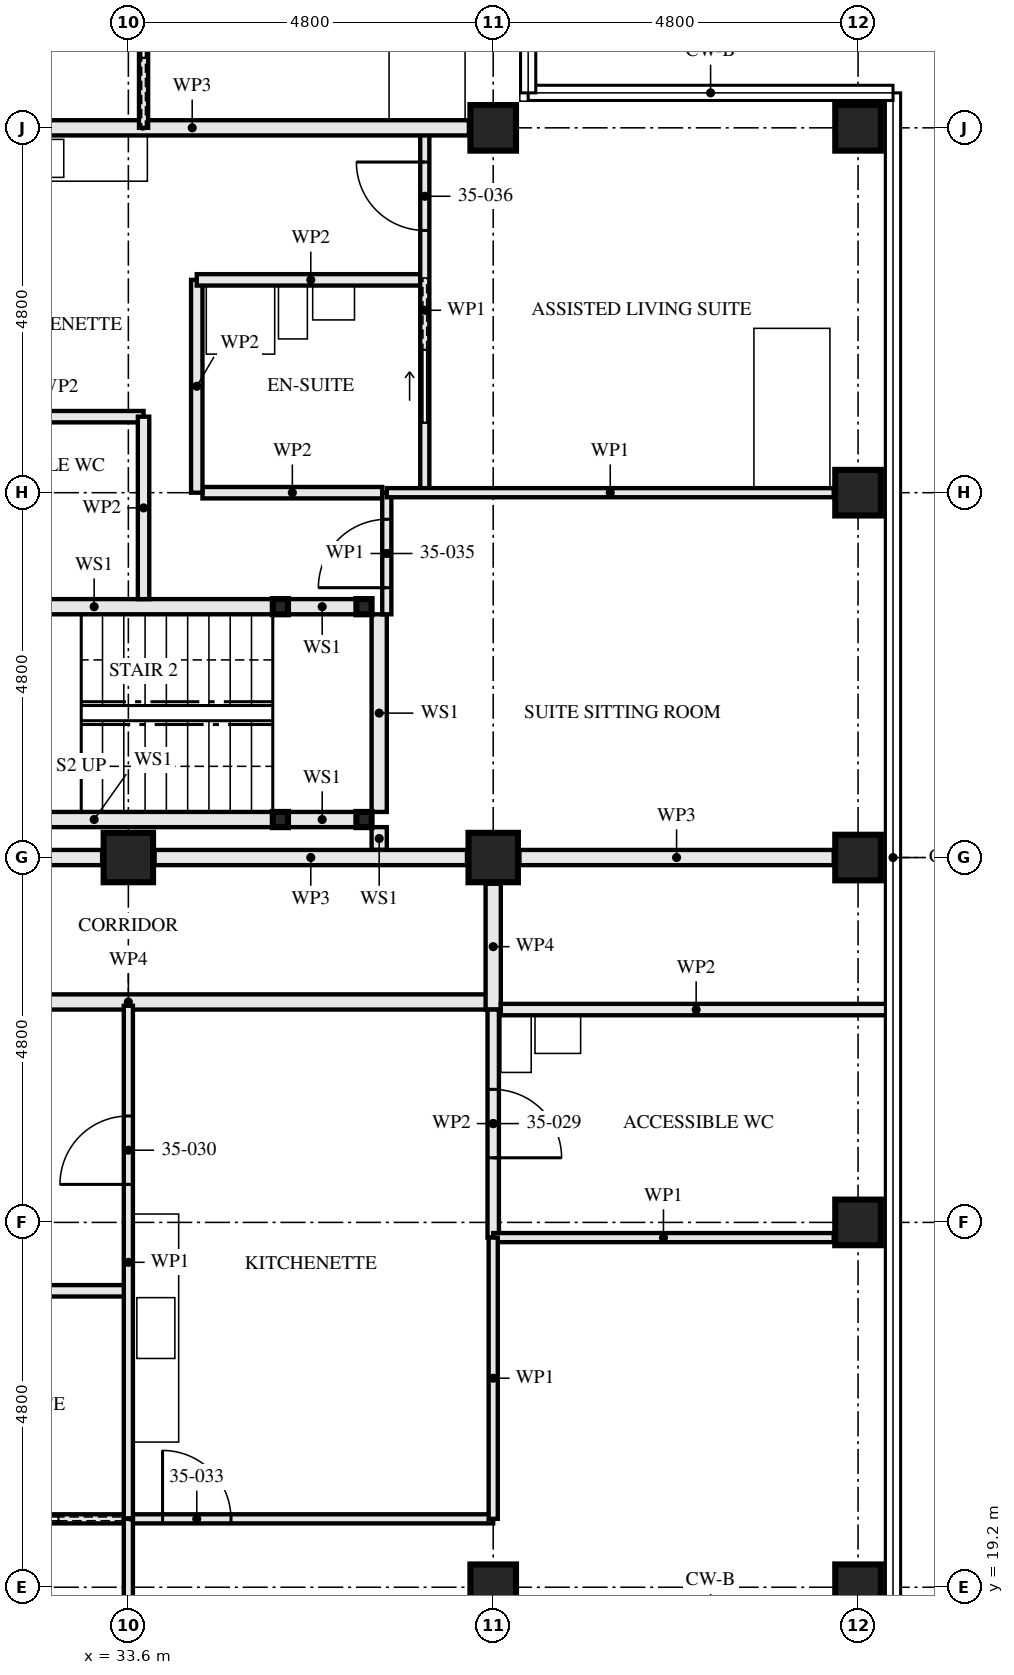
"""IFC4 building model, lengths in metres.
Left out: names, types, materials, properties, quantities, classifications, styles, units other than length and angle.
Written with IfcOpenShell. Run it as: python <this file> out.ifc"""

import sys

from ifc_helpers import new_model, si_unit, direction, frame, frame_2d, origin, origin_2d, place, context, subcontext, project, spatial, rectangle, hollow_rectangle, extrude, element, fill, save


model = new_model("IFC4")
c1 = context("Model", 3, precision=1e-05, world=origin(), true_north=direction((0.0, 1.0)))
c2 = subcontext(c1, "Body", "Model", "MODEL_VIEW")
j1 = project(units=[si_unit("LENGTHUNIT", "METRE"), si_unit("PLANEANGLEUNIT", "RADIAN")], contexts=[c1])
p1 = place(None, origin())
s1 = spatial("IfcSite", under=j1, at=p1, CompositionType="ELEMENT")
p2 = place(p1, origin())
s2 = spatial("IfcBuilding", under=s1, at=p2, CompositionType="ELEMENT")
p3 = place(p2, frame((0.0, 0.0, 129.5)))
s3 = spatial("IfcBuildingStorey", under=s2, at=p3, CompositionType="ELEMENT", Elevation=129.5)
p4 = place(p3, frame((33.6, 28.8, 0.0), z_axis=(0.0, 0.0, 1.0), x_axis=(0.0, 1.0, 0.0)))
e1 = element("IfcColumn", 1, at=p4, inside=s3, PredefinedType="COLUMN", context=c2, shape_type="SweptSolid", body=[
    extrude(hollow_rectangle(XDim=0.65, YDim=0.65, WallThickness=0.05, at=origin_2d()), origin(), (0.0, 0.0, 1.0), 3.5),
])
p5 = place(p3, frame((38.4, 19.2, 0.0), z_axis=(0.0, 0.0, 1.0), x_axis=(0.0, 1.0, 0.0)))
e2 = element("IfcColumn", 2, at=p5, inside=s3, PredefinedType="COLUMN", context=c2, shape_type="SweptSolid", body=[
    extrude(hollow_rectangle(XDim=0.6, YDim=0.6, WallThickness=0.08, at=origin_2d()), origin(), (0.0, 0.0, 1.0), 3.5),
])
p6 = place(p3, frame((38.4, 28.8, 0.0), z_axis=(0.0, 0.0, 1.0), x_axis=(0.0, 1.0, 0.0)))
e3 = element("IfcColumn", 3, at=p6, inside=s3, PredefinedType="COLUMN", context=c2, shape_type="SweptSolid", body=[
    extrude(hollow_rectangle(XDim=0.65, YDim=0.65, WallThickness=0.05, at=origin_2d()), origin(), (0.0, 0.0, 1.0), 3.5),
])
for number, where, z_axis, x_axis in (
    (4, (38.4, 38.4, 0.0), (0.0, 0.0, 1.0), (0.0, 1.0, 0.0)),
    (5, (43.2, 19.2, 0.0), (0.0, 0.0, 1.0), (0.0, 1.0, 0.0)),
    (6, (43.2, 24.0, 0.0), (0.0, 0.0, 1.0), (1.0, 0.0, 0.0)),
    (7, (43.2, 28.8, 0.0), (0.0, 0.0, 1.0), (0.0, 1.0, 0.0)),
    (8, (43.2, 33.6, 0.0), (0.0, 0.0, 1.0), (1.0, 0.0, 0.0)),
    (9, (43.2, 38.4, 0.0), (0.0, 0.0, 1.0), (0.0, 1.0, 0.0)),
):
    element("IfcColumn", number, at=place(p3, frame(where, z_axis=z_axis, x_axis=x_axis)), inside=s3, PredefinedType="COLUMN", context=c2, shape_type="SweptSolid", body=[
        extrude(hollow_rectangle(XDim=0.6, YDim=0.6, WallThickness=0.08, at=origin_2d()), origin(), (0.0, 0.0, 1.0), 3.5),
    ])
for number, where, z_axis, x_axis in (
    (10, (36.7, 29.3, 0.0), (0.0, 0.0, 1.0), (1.0, 0.0, 0.0)),
    (11, (36.7, 32.1, 0.0), (0.0, 0.0, 1.0), (1.0, 0.0, 0.0)),
    (12, (35.6, 29.3, 0.0), (0.0, 0.0, 1.0), (1.0, 0.0, 0.0)),
    (13, (35.6, 32.1, 0.0), (0.0, 0.0, 1.0), (1.0, 0.0, 0.0)),
):
    element("IfcColumn", number, at=place(p3, frame(where, z_axis=z_axis, x_axis=x_axis)), inside=s3, PredefinedType="COLUMN", context=c2, shape_type="SweptSolid", body=[
        extrude(hollow_rectangle(XDim=0.2, YDim=0.2, WallThickness=0.008, at=origin_2d()), origin(), (0.0, 0.0, 1.0), 3.33),
    ])
p7 = place(p3, frame((30.8, 23.1, 0.0), z_axis=(0.0, 0.0, 1.0), x_axis=(1.0, 0.0, 0.0)))
e14 = element("IfcWall", 14, at=p7, inside=s3, PredefinedType="PARTITIONING", context=c2, shape_type="SweptSolid", body=[
    extrude(rectangle(XDim=2.8, YDim=0.15, at=frame_2d((1.4, 0.0))), origin(), (0.0, 0.0, 1.0), 3.33),
])
p8 = place(p3, frame((38.4, 23.8, 0.0), z_axis=(0.0, 0.0, 1.0), x_axis=(0.0, 1.0, 0.0)))
e15 = element("IfcWall", 15, at=p8, inside=s3, PredefinedType="PARTITIONING", context=c2, shape_type="SweptSolid", body=[
    extrude(rectangle(XDim=3.0, YDim=0.15, at=frame_2d((1.5, 0.0))), origin(), (0.0, 0.0, 1.0), 2.55),
])
p9 = place(p8, frame((1.05, 0.0, 0.0)))
e16 = element("IfcOpeningElement", 16, at=p9, cuts=e15, PredefinedType="OPENING", context=c2, shape_type="SweptSolid", body=[
    extrude(rectangle(XDim=0.9, YDim=2.1, at=frame_2d((0.45, 1.05))), frame((0.0, 0.085, 0.0), z_axis=(0.0, -1.0, 0.0), x_axis=(1.0, 0.0, 0.0)), (0.0, 0.0, 1.0), 0.171),
])
p10 = place(p3, frame((33.6, 20.1, 0.0), z_axis=(0.0, 0.0, 1.0), x_axis=(0.0, 1.0, 0.0)))
e17 = element("IfcWall", 17, at=p10, inside=s3, PredefinedType="PARTITIONING", context=c2, shape_type="SweptSolid", body=[
    extrude(rectangle(XDim=6.75, YDim=0.12, at=frame_2d((3.375, 0.0))), origin(), (0.0, 0.0, 1.0), 2.55),
])
p11 = place(p10, frame((4.4, 0.0, 0.0)))
e18 = element("IfcOpeningElement", 18, at=p11, cuts=e17, PredefinedType="OPENING", context=c2, shape_type="SweptSolid", body=[
    extrude(rectangle(XDim=0.9, YDim=2.1, at=frame_2d((0.45, 1.05))), frame((0.0, 0.071, 0.0), z_axis=(0.0, -1.0, 0.0), x_axis=(1.0, 0.0, 0.0)), (0.0, 0.0, 1.0), 0.141),
])
p12 = place(p3, frame((28.8, 20.1, 0.0), z_axis=(0.0, 0.0, 1.0), x_axis=(1.0, 0.0, 0.0)))
e19 = element("IfcWall", 19, at=p12, inside=s3, PredefinedType="PARTITIONING", context=c2, shape_type="SweptSolid", body=[
    extrude(rectangle(XDim=4.8, YDim=0.12, at=frame_2d((2.4, 0.0))), origin(), (0.0, 0.0, 1.0), 3.33),
])
p13 = place(p12, frame((0.45, 0.0, 0.0)))
e20 = element("IfcOpeningElement", 20, at=p13, cuts=e19, PredefinedType="OPENING", context=c2, shape_type="SweptSolid", body=[
    extrude(rectangle(XDim=0.9, YDim=2.1, at=frame_2d((0.45, 1.05))), frame((0.0, 0.071, 0.0), z_axis=(0.0, -1.0, 0.0), x_axis=(1.0, 0.0, 0.0)), (0.0, 0.0, 1.0), 0.141),
])
p14 = place(p12, frame((2.925, 0.0, 0.0)))
e21 = element("IfcOpeningElement", 21, at=p14, cuts=e19, PredefinedType="OPENING", context=c2, shape_type="SweptSolid", body=[
    extrude(rectangle(XDim=0.95, YDim=2.1, at=frame_2d((0.475, 1.05))), frame((0.0, 0.071, 0.0), z_axis=(0.0, -1.0, 0.0), x_axis=(1.0, 0.0, 0.0)), (0.0, 0.0, 1.0), 0.141),
])
p15 = place(p3, frame((33.6, 20.1, 0.0), z_axis=(0.0, 0.0, 1.0), x_axis=(1.0, 0.0, 0.0)))
e22 = element("IfcWall", 22, at=p15, inside=s3, PredefinedType="PARTITIONING", context=c2, shape_type="SweptSolid", body=[
    extrude(rectangle(XDim=4.8, YDim=0.12, at=frame_2d((2.4, 0.0))), origin(), (0.0, 0.0, 1.0), 3.33),
])
p16 = place(p15, frame((0.45, 0.0, 0.0)))
e23 = element("IfcOpeningElement", 23, at=p16, cuts=e22, PredefinedType="OPENING", context=c2, shape_type="SweptSolid", body=[
    extrude(rectangle(XDim=0.9, YDim=2.1, at=frame_2d((0.45, 1.05))), frame((0.0, 0.071, 0.0), z_axis=(0.0, -1.0, 0.0), x_axis=(1.0, 0.0, 0.0)), (0.0, 0.0, 1.0), 0.141),
])
p17 = place(p3, frame((38.4, 23.8, 0.0), z_axis=(0.0, 0.0, 1.0), x_axis=(1.0, 0.0, 0.0)))
e24 = element("IfcWall", 24, at=p17, inside=s3, PredefinedType="PARTITIONING", context=c2, shape_type="SweptSolid", body=[
    extrude(rectangle(XDim=4.48, YDim=0.12, at=frame_2d((2.24, 0.0))), origin(), (0.0, 0.0, 1.0), 3.33),
])
p18 = place(p3, frame((33.6, 14.72, 0.0), z_axis=(0.0, 0.0, 1.0), x_axis=(0.0, 1.0, 0.0)))
e25 = element("IfcWall", 25, at=p18, inside=s3, PredefinedType="PARTITIONING", context=c2, shape_type="SweptSolid", body=[
    extrude(rectangle(XDim=5.38, YDim=0.12, at=frame_2d((2.69, 0.0))), origin(), (0.0, 0.0, 1.0), 2.55),
])
p19 = place(p3, frame((38.4, 20.1, 0.0), z_axis=(0.0, 0.0, 1.0), x_axis=(0.0, 1.0, 0.0)))
e26 = element("IfcWall", 26, at=p19, inside=s3, PredefinedType="PARTITIONING", context=c2, shape_type="SweptSolid", body=[
    extrude(rectangle(XDim=3.7, YDim=0.12, at=frame_2d((1.85, 0.0))), origin(), (0.0, 0.0, 1.0), 3.33),
])
p20 = place(p3, frame((28.8, 26.9, 0.0), z_axis=(0.0, 0.0, 1.0), x_axis=(1.0, 0.0, 0.0)))
e27 = element("IfcWall", 27, at=p20, inside=s3, PredefinedType="PARTITIONING", context=c2, shape_type="SweptSolid", body=[
    extrude(rectangle(XDim=9.6, YDim=0.2, at=frame_2d((4.8, 0.0))), origin(), (0.0, 0.0, 1.0), 3.33),
])
p21 = place(p20, frame((0.4, 0.0, 0.0)))
e28 = element("IfcOpeningElement", 28, at=p21, cuts=e27, PredefinedType="OPENING", context=c2, shape_type="SweptSolid", body=[
    extrude(rectangle(XDim=1.0, YDim=2.1, at=frame_2d((0.5, 1.05))), frame((0.0, 0.111, 0.0), z_axis=(0.0, -1.0, 0.0), x_axis=(1.0, 0.0, 0.0)), (0.0, 0.0, 1.0), 0.221),
])
p22 = place(p3, frame((38.4, 26.8, 0.0), z_axis=(0.0, 0.0, 1.0), x_axis=(0.0, 1.0, 0.0)))
e29 = element("IfcWall", 29, at=p22, inside=s3, PredefinedType="PARTITIONING", context=c2, shape_type="SweptSolid", body=[
    extrude(rectangle(XDim=1.655, YDim=0.2, at=frame_2d((0.828, 0.0))), origin(), (0.0, 0.0, 1.0), 3.33),
])
p23 = place(p3, frame((36.6, 29.3, 0.0), z_axis=(0.0, 0.0, 1.0), x_axis=(-1.0, 0.0, 0.0)))
e30 = element("IfcWall", 30, at=p23, inside=s3, PredefinedType="SOLIDWALL", context=c2, shape_type="SweptSolid", body=[
    extrude(rectangle(XDim=0.9, YDim=0.2, at=frame_2d((0.45, 0.0))), origin(), (0.0, 0.0, 1.0), 2.99),
])
p24 = place(p3, frame((35.5, 29.3, 0.0), z_axis=(0.0, 0.0, 1.0), x_axis=(-1.0, 0.0, 0.0)))
e31 = element("IfcWall", 31, at=p24, inside=s3, PredefinedType="SOLIDWALL", context=c2, shape_type="SweptSolid", body=[
    extrude(rectangle(XDim=4.7, YDim=0.2, at=frame_2d((2.35, 0.0))), origin(), (0.0, 0.0, 1.0), 2.99),
])
p25 = place(p3, frame((36.6, 32.1, 0.0), z_axis=(0.0, 0.0, 1.0), x_axis=(-1.0, 0.0, 0.0)))
e32 = element("IfcWall", 32, at=p25, inside=s3, PredefinedType="SOLIDWALL", context=c2, shape_type="SweptSolid", body=[
    extrude(rectangle(XDim=0.9, YDim=0.2, at=frame_2d((0.45, 0.0))), origin(), (0.0, 0.0, 1.0), 2.99),
])
p26 = place(p3, frame((35.5, 32.1, 0.0), z_axis=(0.0, 0.0, 1.0), x_axis=(-1.0, 0.0, 0.0)))
e33 = element("IfcWall", 33, at=p26, inside=s3, PredefinedType="SOLIDWALL", context=c2, shape_type="SweptSolid", body=[
    extrude(rectangle(XDim=4.7, YDim=0.2, at=frame_2d((2.35, 0.0))), origin(), (0.0, 0.0, 1.0), 2.99),
])
p27 = place(p3, frame((36.9, 28.9, 0.0), z_axis=(0.0, 0.0, 1.0), x_axis=(0.0, 1.0, 0.0)))
e34 = element("IfcWall", 34, at=p27, inside=s3, PredefinedType="SOLIDWALL", context=c2, shape_type="SweptSolid", body=[
    extrude(rectangle(XDim=0.3, YDim=0.2, at=frame_2d((0.15, 0.0))), origin(), (0.0, 0.0, 1.0), 3.33),
])
p28 = place(p3, frame((36.9, 29.4, 0.0), z_axis=(0.0, 0.0, 1.0), x_axis=(0.0, 1.0, 0.0)))
e35 = element("IfcWall", 35, at=p28, inside=s3, PredefinedType="SOLIDWALL", context=c2, shape_type="SweptSolid", body=[
    extrude(rectangle(XDim=2.6, YDim=0.2, at=frame_2d((1.3, 0.0))), origin(), (0.0, 0.0, 1.0), 3.33),
])
p29 = place(p3, frame((33.8, 32.2, 0.0), z_axis=(0.0, 0.0, 1.0), x_axis=(0.0, 1.0, 0.0)))
e36 = element("IfcWall", 36, at=p29, inside=s3, PredefinedType="PARTITIONING", context=c2, shape_type="SweptSolid", body=[
    extrude(rectangle(XDim=2.4, YDim=0.15, at=frame_2d((1.2, 0.0))), origin(), (0.0, 0.0, 1.0), 2.55),
])
for number, where, z_axis, x_axis in (
    (37, (33.8, 34.6, 0.0), (0.0, 0.0, 1.0), (-1.0, 0.0, 0.0)),
    (38, (37.5, 36.4, 0.0), (0.0, 0.0, 1.0), (-1.0, 0.0, 0.0)),
):
    element("IfcWall", number, at=place(p3, frame(where, z_axis=z_axis, x_axis=x_axis)), inside=s3, PredefinedType="PARTITIONING", context=c2, shape_type="SweptSolid", body=[
        extrude(rectangle(XDim=3.0, YDim=0.15, at=frame_2d((1.5, 0.0))), origin(), (0.0, 0.0, 1.0), 3.33),
    ])
p30 = place(p3, frame((34.5, 33.6, 0.0), z_axis=(0.0, 0.0, 1.0), x_axis=(0.0, 1.0, 0.0)))
e39 = element("IfcWall", 39, at=p30, inside=s3, PredefinedType="PARTITIONING", context=c2, shape_type="SweptSolid", body=[
    extrude(rectangle(XDim=2.8, YDim=0.15, at=frame_2d((1.4, 0.0))), origin(), (0.0, 0.0, 1.0), 3.33),
])
p31 = place(p3, frame((37.0, 32.0, 0.0), z_axis=(0.0, 0.0, 1.0), x_axis=(0.0, 1.0, 0.0)))
e40 = element("IfcWall", 40, at=p31, inside=s3, PredefinedType="PARTITIONING", context=c2, shape_type="SweptSolid", body=[
    extrude(rectangle(XDim=1.6, YDim=0.12, at=frame_2d((0.8, 0.0))), origin(), (0.0, 0.0, 1.0), 3.33),
])
p32 = place(p31, frame((0.35, 0.0, 0.0)))
e41 = element("IfcOpeningElement", 41, at=p32, cuts=e40, PredefinedType="OPENING", context=c2, shape_type="SweptSolid", body=[
    extrude(rectangle(XDim=0.9, YDim=2.1, at=frame_2d((0.45, 1.05))), frame((0.0, 0.071, 0.0), z_axis=(0.0, -1.0, 0.0), x_axis=(1.0, 0.0, 0.0)), (0.0, 0.0, 1.0), 0.141),
])
p33 = place(p3, frame((37.5, 33.6, 0.0), z_axis=(0.0, 0.0, 1.0), x_axis=(0.0, 1.0, 0.0)))
e42 = element("IfcWall", 42, at=p33, inside=s3, PredefinedType="PARTITIONING", context=c2, shape_type="SweptSolid", body=[
    extrude(rectangle(XDim=4.8, YDim=0.12, at=frame_2d((2.4, 0.0))), origin(), (0.0, 0.0, 1.0), 3.33),
])
p34 = place(p33, frame((3.45, 0.0, 0.0)))
e43 = element("IfcOpeningElement", 43, at=p34, cuts=e42, PredefinedType="OPENING", context=c2, shape_type="SweptSolid", body=[
    extrude(rectangle(XDim=0.9, YDim=2.1, at=frame_2d((0.45, 1.05))), frame((0.0, 0.071, 0.0), z_axis=(0.0, -1.0, 0.0), x_axis=(1.0, 0.0, 0.0)), (0.0, 0.0, 1.0), 0.141),
])
p35 = place(p33, frame((0.925, 0.0, 0.0)))
e44 = element("IfcOpeningElement", 44, at=p35, cuts=e42, PredefinedType="OPENING", context=c2, shape_type="SweptSolid", body=[
    extrude(rectangle(XDim=0.95, YDim=2.1, at=frame_2d((0.475, 1.05))), frame((0.0, 0.071, 0.0), z_axis=(0.0, -1.0, 0.0), x_axis=(1.0, 0.0, 0.0)), (0.0, 0.0, 1.0), 0.141),
])
p36 = place(p3, frame((42.88, 33.6, 0.0), z_axis=(0.0, 0.0, 1.0), x_axis=(-1.0, 0.0, 0.0)))
e45 = element("IfcWall", 45, at=p36, inside=s3, PredefinedType="PARTITIONING", context=c2, shape_type="SweptSolid", body=[
    extrude(rectangle(XDim=5.88, YDim=0.12, at=frame_2d((2.94, 0.0))), origin(), (0.0, 0.0, 1.0), 2.55),
])
p37 = place(p3, frame((38.08, 38.4, 0.0), z_axis=(0.0, 0.0, 1.0), x_axis=(-1.0, 0.0, 0.0)))
e46 = element("IfcWall", 46, at=p37, inside=s3, PredefinedType="PARTITIONING", context=c2, shape_type="SweptSolid", body=[
    extrude(rectangle(XDim=7.28, YDim=0.2, at=frame_2d((3.64, 0.0))), origin(), (0.0, 0.0, 1.0), 2.55),
])
p38 = place(p3, frame((33.8, 38.4, 0.0), z_axis=(0.0, 0.0, 1.0), x_axis=(0.0, 1.0, 0.0)))
e47 = element("IfcWall", 47, at=p38, inside=s3, PredefinedType="PARTITIONING", context=c2, shape_type="SweptSolid", body=[
    extrude(rectangle(XDim=4.48, YDim=0.12, at=frame_2d((2.24, 0.0))), origin(), (0.0, 0.0, 1.0), 3.33),
])
p39 = place(p38, frame((2.975, 0.0, 0.0)))
e48 = element("IfcOpeningElement", 48, at=p39, cuts=e47, PredefinedType="OPENING", context=c2, shape_type="SweptSolid", body=[
    extrude(rectangle(XDim=0.9, YDim=2.1, at=frame_2d((0.45, 1.05))), frame((0.0, 0.071, 0.0), z_axis=(0.0, -1.0, 0.0), x_axis=(1.0, 0.0, 0.0)), (0.0, 0.0, 1.0), 0.141),
])
p40 = place(p38, frame((0.925, 0.0, 0.0)))
e49 = element("IfcOpeningElement", 49, at=p40, cuts=e47, PredefinedType="OPENING", context=c2, shape_type="SweptSolid", body=[
    extrude(rectangle(XDim=0.95, YDim=2.1, at=frame_2d((0.475, 1.05))), frame((0.0, 0.071, 0.0), z_axis=(0.0, -1.0, 0.0), x_axis=(1.0, 0.0, 0.0)), (0.0, 0.0, 1.0), 0.141),
])
p41 = place(p3, frame((42.88, 28.8, 0.0), z_axis=(0.0, 0.0, 1.0), x_axis=(-1.0, 0.0, 0.0)))
e50 = element("IfcWall", 50, at=p41, inside=s3, PredefinedType="PARTITIONING", context=c2, shape_type="SweptSolid", body=[
    extrude(rectangle(XDim=4.135, YDim=0.2, at=frame_2d((2.067, 0.0))), origin(), (0.0, 0.0, 1.0), 2.32),
])
p42 = place(p3, frame((38.055, 28.8, 0.0), z_axis=(0.0, 0.0, 1.0), x_axis=(-1.0, 0.0, 0.0)))
e51 = element("IfcWall", 51, at=p42, inside=s3, PredefinedType="PARTITIONING", context=c2, shape_type="SweptSolid", body=[
    extrude(rectangle(XDim=4.11, YDim=0.2, at=frame_2d((2.055, 0.0))), origin(), (0.0, 0.0, 1.0), 2.32),
])
p43 = place(p3, frame((33.255, 28.8, 0.0), z_axis=(0.0, 0.0, 1.0), x_axis=(-1.0, 0.0, 0.0)))
e52 = element("IfcWall", 52, at=p43, inside=s3, PredefinedType="PARTITIONING", context=c2, shape_type="SweptSolid", body=[
    extrude(rectangle(XDim=2.555, YDim=0.2, at=frame_2d((1.277, 0.0))), origin(), (0.0, 0.0, 1.0), 2.32),
])
p44 = place(p3, frame((38.5, 26.8, 0.0), z_axis=(0.0, 0.0, 1.0), x_axis=(1.0, 0.0, 0.0)))
e53 = element("IfcWall", 53, at=p44, inside=s3, PredefinedType="PARTITIONING", context=c2, shape_type="SweptSolid", body=[
    extrude(rectangle(XDim=5.14, YDim=0.15, at=frame_2d((2.57, 0.0))), origin(), (0.0, 0.0, 1.0), 2.32),
])
p45 = place(p3, frame((36.94, 33.6, 0.0), z_axis=(0.0, 0.0, 1.0), x_axis=(-1.0, 0.0, 0.0)))
e54 = element("IfcWall", 54, at=p45, inside=s3, PredefinedType="PARTITIONING", context=c2, shape_type="SweptSolid", body=[
    extrude(rectangle(XDim=2.365, YDim=0.15, at=frame_2d((1.183, 0.0))), origin(), (0.0, 0.0, 1.0), 2.55),
])
p46 = place(p9, frame((0.9, 0.0, 0.0), z_axis=(0.0, 0.0, 1.0), x_axis=(-1.0, 0.0, 0.0)))
e55 = element("IfcDoor", 55, at=p46, inside=s3, OperationType="SINGLE_SWING_LEFT", PredefinedType="DOOR", context=c2, shape_type="SweptSolid", body=[
    extrude(rectangle(XDim=0.9, YDim=2.1, at=frame_2d((0.45, 1.05))), frame((0.0, 0.022, 0.0), z_axis=(0.0, -1.0, 0.0), x_axis=(1.0, 0.0, 0.0)), (0.0, 0.0, 1.0), 0.044),
])
fill(e16, e55)
p47 = place(p11, origin())
e56 = element("IfcDoor", 56, at=p47, inside=s3, OperationType="SINGLE_SWING_RIGHT", PredefinedType="DOOR", context=c2, shape_type="SweptSolid", body=[
    extrude(rectangle(XDim=0.9, YDim=2.1, at=frame_2d((0.45, 1.05))), frame((0.0, 0.022, 0.0), z_axis=(0.0, -1.0, 0.0), x_axis=(1.0, 0.0, 0.0)), (0.0, 0.0, 1.0), 0.044),
])
fill(e18, e56)
p48 = place(p14, origin())
e57 = element("IfcDoor", 57, at=p48, inside=s3, OperationType="SLIDING_TO_LEFT", PredefinedType="DOOR", context=c2, shape_type="SweptSolid", body=[
    extrude(rectangle(XDim=0.95, YDim=2.1, at=frame_2d((0.475, 1.05))), frame((0.0, 0.022, 0.0), z_axis=(0.0, -1.0, 0.0), x_axis=(1.0, 0.0, 0.0)), (0.0, 0.0, 1.0), 0.044),
])
fill(e21, e57)
p49 = place(p16, origin())
e58 = element("IfcDoor", 58, at=p49, inside=s3, OperationType="SINGLE_SWING_RIGHT", PredefinedType="DOOR", context=c2, shape_type="SweptSolid", body=[
    extrude(rectangle(XDim=0.9, YDim=2.1, at=frame_2d((0.45, 1.05))), frame((0.0, 0.022, 0.0), z_axis=(0.0, -1.0, 0.0), x_axis=(1.0, 0.0, 0.0)), (0.0, 0.0, 1.0), 0.044),
])
fill(e23, e58)
p50 = place(p32, origin())
e59 = element("IfcDoor", 59, at=p50, inside=s3, OperationType="SINGLE_SWING_RIGHT", PredefinedType="DOOR", context=c2, shape_type="SweptSolid", body=[
    extrude(rectangle(XDim=0.9, YDim=2.1, at=frame_2d((0.45, 1.05))), frame((0.0, 0.022, 0.0), z_axis=(0.0, -1.0, 0.0), x_axis=(1.0, 0.0, 0.0)), (0.0, 0.0, 1.0), 0.044),
])
fill(e41, e59)
p51 = place(p34, origin())
e60 = element("IfcDoor", 60, at=p51, inside=s3, OperationType="SINGLE_SWING_LEFT", PredefinedType="DOOR", context=c2, shape_type="SweptSolid", body=[
    extrude(rectangle(XDim=0.9, YDim=2.1, at=frame_2d((0.45, 1.05))), frame((0.0, 0.022, 0.0), z_axis=(0.0, -1.0, 0.0), x_axis=(1.0, 0.0, 0.0)), (0.0, 0.0, 1.0), 0.044),
])
fill(e43, e60)
p52 = place(p35, origin())
e61 = element("IfcDoor", 61, at=p52, inside=s3, OperationType="SLIDING_TO_LEFT", PredefinedType="DOOR", context=c2, shape_type="SweptSolid", body=[
    extrude(rectangle(XDim=0.95, YDim=2.1, at=frame_2d((0.475, 1.05))), frame((0.0, 0.022, 0.0), z_axis=(0.0, -1.0, 0.0), x_axis=(1.0, 0.0, 0.0)), (0.0, 0.0, 1.0), 0.044),
])
fill(e44, e61)
p53 = place(p40, origin())
e62 = element("IfcDoor", 62, at=p53, inside=s3, OperationType="SLIDING_TO_RIGHT", PredefinedType="DOOR", context=c2, shape_type="SweptSolid", body=[
    extrude(rectangle(XDim=0.95, YDim=2.1, at=frame_2d((0.475, 1.05))), frame((0.0, 0.022, 0.0), z_axis=(0.0, -1.0, 0.0), x_axis=(1.0, 0.0, 0.0)), (0.0, 0.0, 1.0), 0.044),
])
fill(e49, e62)
save(model, sys.argv[1])
